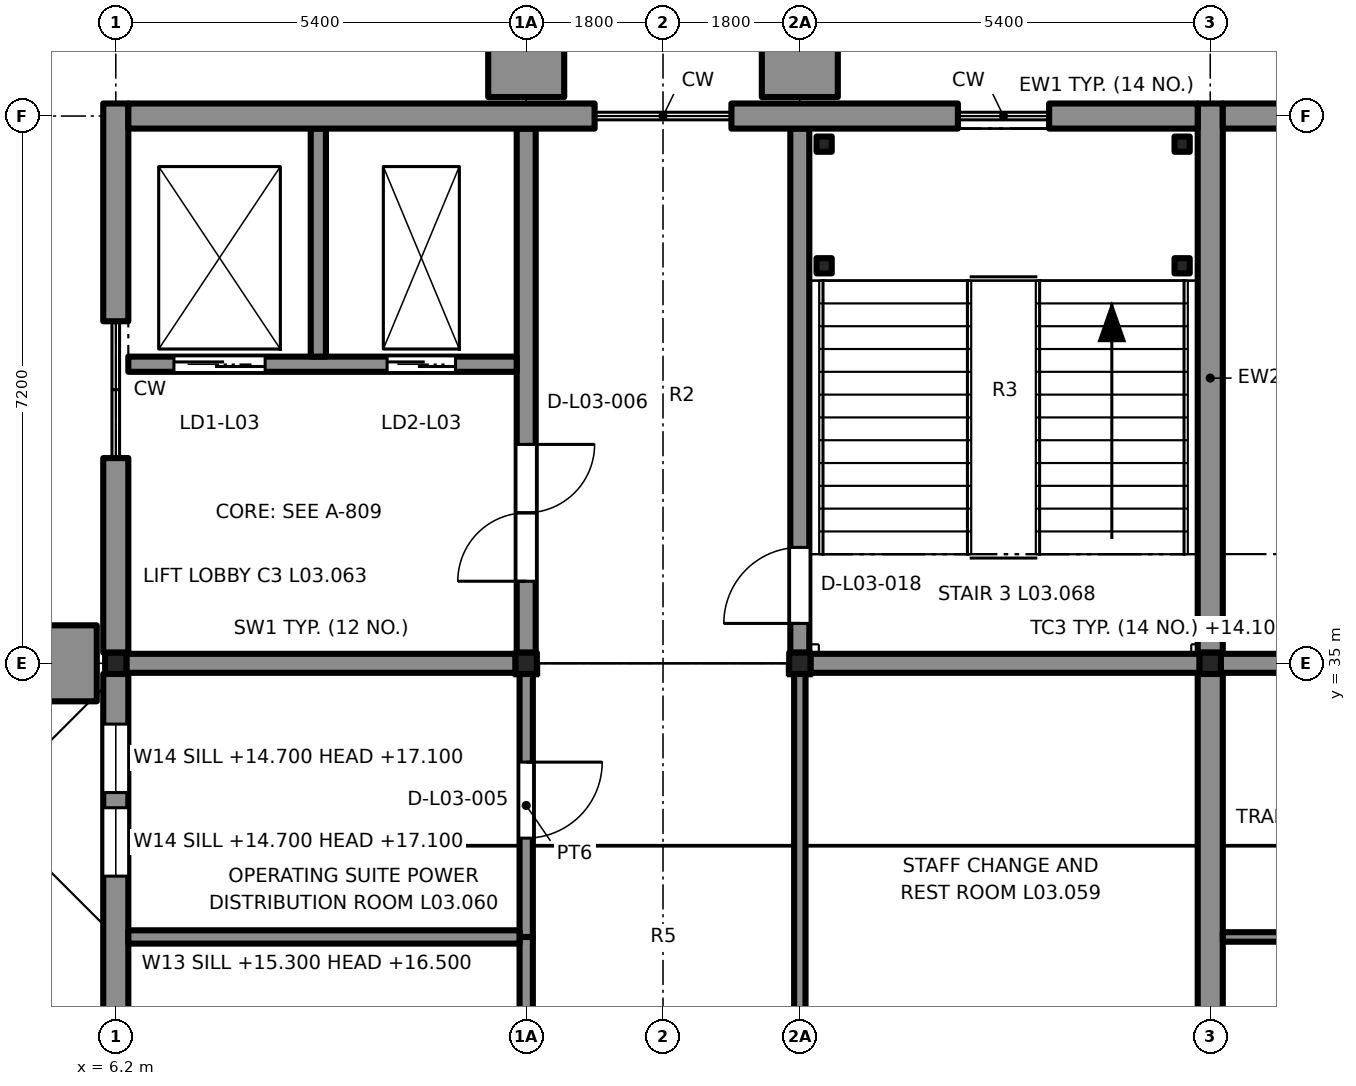
"""IFC4 building model, lengths in metres.
Left out: names, types, materials, properties, quantities, classifications, styles, units other than length and angle.
Written with IfcOpenShell. Run it as: python <this file> out.ifc"""

import sys

from ifc_helpers import new_model, si_unit, direction, frame, frame_2d, origin, origin_2d, place, context, subcontext, project, spatial, rectangle, extrude, element, fill, save


model = new_model("IFC4")
c1 = context("Model", 3, precision=1e-05, world=origin(), true_north=direction((0.0, 1.0)))
c2 = subcontext(c1, "Body", "Model", "MODEL_VIEW")
j1 = project(units=[si_unit("LENGTHUNIT", "METRE"), si_unit("PLANEANGLEUNIT", "RADIAN")], contexts=[c1])
p1 = place(None, origin())
s1 = spatial("IfcSite", under=j1, at=p1, CompositionType="ELEMENT")
p2 = place(p1, origin())
s2 = spatial("IfcBuilding", under=s1, at=p2, CompositionType="ELEMENT")
p3 = place(p2, frame((0.0, 0.0, 14.1)))
s3 = spatial("IfcBuildingStorey", under=s2, at=p3, CompositionType="ELEMENT", Elevation=14.1)
for number, where, z_axis, x_axis in (
    (1, (6.2, 35.0, 0.0), (0.0, 0.0, 1.0), (1.0, 0.0, 0.0)),
    (2, (11.6, 35.0, 0.0), (0.0, 0.0, 1.0), (1.0, 0.0, 0.0)),
    (3, (15.2, 35.0, 0.0), (0.0, 0.0, 1.0), (1.0, 0.0, 0.0)),
    (4, (20.6, 35.0, 0.0), (0.0, 0.0, 1.0), (1.0, 0.0, 0.0)),
):
    element("IfcColumn", number, at=place(p3, frame(where, z_axis=z_axis, x_axis=x_axis)), inside=s3, PredefinedType="COLUMN", context=c2, shape_type="SweptSolid", body=[
        extrude(rectangle(XDim=0.28, YDim=0.28, at=origin_2d()), origin(), (0.0, 0.0, 1.0), 3.9),
    ])
p4 = place(p3, frame((15.2, 35.14, 0.0), z_axis=(0.0, 0.0, 1.0), x_axis=(0.0, 1.0, 0.0)))
e5 = element("IfcWall", 5, at=p4, inside=s3, PredefinedType="SHEAR", context=c2, shape_type="SweptSolid", body=[
    extrude(rectangle(XDim=6.895, YDim=0.25, at=frame_2d((3.448, 0.0))), origin(), (0.0, 0.0, 1.0), 3.2),
])
p5 = place(p4, frame((0.385, 0.0, 0.0)))
e6 = element("IfcOpeningElement", 6, at=p5, cuts=e5, PredefinedType="OPENING", context=c2, shape_type="SweptSolid", body=[
    extrude(rectangle(XDim=1.0, YDim=2.1, at=frame_2d((0.5, 1.05))), frame((0.0, 0.135, 0.0), z_axis=(0.0, -1.0, 0.0), x_axis=(1.0, 0.0, 0.0)), (0.0, 0.0, 1.0), 0.27),
])
p6 = place(p3, frame((15.34, 35.0, 0.0), z_axis=(0.0, 0.0, 1.0), x_axis=(1.0, 0.0, 0.0)))
e7 = element("IfcWall", 7, at=p6, inside=s3, PredefinedType="SHEAR", context=c2, shape_type="SweptSolid", body=[
    extrude(rectangle(XDim=5.12, YDim=0.25, at=frame_2d((2.56, 0.0))), origin(), (0.0, 0.0, 1.0), 3.2),
])
p7 = place(p3, frame((11.6, 35.14, 0.0), z_axis=(0.0, 0.0, 1.0), x_axis=(0.0, 1.0, 0.0)))
e8 = element("IfcWall", 8, at=p7, inside=s3, PredefinedType="SHEAR", context=c2, shape_type="SweptSolid", body=[
    extrude(rectangle(XDim=6.895, YDim=0.25, at=frame_2d((3.448, 0.0))), origin(), (0.0, 0.0, 1.0), 3.2),
])
p8 = place(p7, frame((0.94, 0.0, 0.0)))
e9 = element("IfcOpeningElement", 9, at=p8, cuts=e8, PredefinedType="OPENING", context=c2, shape_type="SweptSolid", body=[
    extrude(rectangle(XDim=1.8, YDim=2.1, at=frame_2d((0.9, 1.05))), frame((0.0, 0.135, 0.0), z_axis=(0.0, -1.0, 0.0), x_axis=(1.0, 0.0, 0.0)), (0.0, 0.0, 1.0), 0.27),
])
p9 = place(p3, frame((6.34, 35.0, 0.0), z_axis=(0.0, 0.0, 1.0), x_axis=(1.0, 0.0, 0.0)))
e10 = element("IfcWall", 10, at=p9, inside=s3, PredefinedType="SHEAR", context=c2, shape_type="SweptSolid", body=[
    extrude(rectangle(XDim=5.12, YDim=0.25, at=frame_2d((2.56, 0.0))), origin(), (0.0, 0.0, 1.0), 3.2),
])
p10 = place(p3, frame((6.365, 38.935, 0.0), z_axis=(0.0, 0.0, 1.0), x_axis=(1.0, 0.0, 0.0)))
e11 = element("IfcWall", 11, at=p10, inside=s3, PredefinedType="SHEAR", context=c2, shape_type="SweptSolid", body=[
    extrude(rectangle(XDim=5.11, YDim=0.2, at=frame_2d((2.555, 0.0))), origin(), (0.0, 0.0, 1.0), 3.2),
])
p11 = place(p10, frame((0.6, 0.0, 0.0)))
e12 = element("IfcOpeningElement", 12, at=p11, cuts=e11, PredefinedType="OPENING", context=c2, shape_type="SweptSolid", body=[
    extrude(rectangle(XDim=1.2, YDim=2.1, at=frame_2d((0.6, 1.05))), frame((0.0, 0.11, 0.0), z_axis=(0.0, -1.0, 0.0), x_axis=(1.0, 0.0, 0.0)), (0.0, 0.0, 1.0), 0.22),
])
p12 = place(p10, frame((3.405, 0.0, 0.0)))
e13 = element("IfcOpeningElement", 13, at=p12, cuts=e11, PredefinedType="OPENING", context=c2, shape_type="SweptSolid", body=[
    extrude(rectangle(XDim=0.9, YDim=2.1, at=frame_2d((0.45, 1.05))), frame((0.0, 0.11, 0.0), z_axis=(0.0, -1.0, 0.0), x_axis=(1.0, 0.0, 0.0)), (0.0, 0.0, 1.0), 0.22),
])
p13 = place(p3, frame((8.865, 42.035, 0.0), z_axis=(0.0, 0.0, 1.0), x_axis=(0.0, -1.0, 0.0)))
e14 = element("IfcWall", 14, at=p13, inside=s3, PredefinedType="SHEAR", context=c2, shape_type="SweptSolid", body=[
    extrude(rectangle(XDim=3.0, YDim=0.2, at=frame_2d((1.5, 0.0))), origin(), (0.0, 0.0, 1.0), 3.2),
])
for number, where, z_axis, x_axis in (
    (15, (15.52, 41.83, 0.0), (0.0, 0.0, 1.0), (1.0, 0.0, 0.0)),
    (16, (20.23, 41.83, 0.0), (0.0, 0.0, 1.0), (1.0, 0.0, 0.0)),
    (17, (15.52, 40.23, 0.0), (0.0, 0.0, 1.0), (1.0, 0.0, 0.0)),
    (18, (20.23, 40.23, 0.0), (0.0, 0.0, 1.0), (1.0, 0.0, 0.0)),
):
    element("IfcColumn", number, at=place(p3, frame(where, z_axis=z_axis, x_axis=x_axis)), inside=s3, PredefinedType="COLUMN", context=c2, shape_type="SweptSolid", body=[
        extrude(rectangle(XDim=0.2, YDim=0.2, at=origin_2d()), origin(), (0.0, 0.0, 1.0), 1.75),
    ])
p14 = place(p3, frame((20.74, 35.0, 0.0), z_axis=(0.0, 0.0, 1.0), x_axis=(1.0, 0.0, 0.0)))
e19 = element("IfcWall", 19, at=p14, inside=s3, PredefinedType="SHEAR", context=c2, shape_type="SweptSolid", body=[
    extrude(rectangle(XDim=5.12, YDim=0.25, at=frame_2d((2.56, 0.0))), origin(), (0.0, 0.0, 1.0), 3.2),
])
p15 = place(p3, frame((6.2, 27.94, 0.0), z_axis=(0.0, 0.0, 1.0), x_axis=(0.0, 1.0, 0.0)))
e20 = element("IfcWall", 20, at=p15, inside=s3, PredefinedType="SOLIDWALL", context=c2, shape_type="SweptSolid", body=[
    extrude(rectangle(XDim=6.92, YDim=0.33, at=frame_2d((3.46, 0.0))), origin(), (0.0, 0.0, 1.0), 3.2),
])
p16 = place(p15, frame((1.06, 0.0, 1.2)))
e21 = element("IfcOpeningElement", 21, at=p16, cuts=e20, PredefinedType="OPENING", context=c2, shape_type="SweptSolid", body=[
    extrude(rectangle(XDim=1.2, YDim=1.2, at=frame_2d((0.6, 0.6))), frame((0.0, 0.175, 0.0), z_axis=(0.0, -1.0, 0.0), x_axis=(1.0, 0.0, 0.0)), (0.0, 0.0, 1.0), 0.35),
])
p17 = place(p15, frame((4.26, 0.0, 0.6)))
e22 = element("IfcOpeningElement", 22, at=p17, cuts=e20, PredefinedType="OPENING", context=c2, shape_type="SweptSolid", body=[
    extrude(rectangle(XDim=0.9, YDim=2.4, at=frame_2d((0.45, 1.2))), frame((0.0, 0.175, 0.0), z_axis=(0.0, -1.0, 0.0), x_axis=(1.0, 0.0, 0.0)), (0.0, 0.0, 1.0), 0.35),
])
p18 = place(p15, frame((5.36, 0.0, 0.6)))
e23 = element("IfcOpeningElement", 23, at=p18, cuts=e20, PredefinedType="OPENING", context=c2, shape_type="SweptSolid", body=[
    extrude(rectangle(XDim=0.9, YDim=2.4, at=frame_2d((0.45, 1.2))), frame((0.0, 0.175, 0.0), z_axis=(0.0, -1.0, 0.0), x_axis=(1.0, 0.0, 0.0)), (0.0, 0.0, 1.0), 0.35),
])
p19 = place(p3, frame((6.2, 35.14, 0.0), z_axis=(0.0, 0.0, 1.0), x_axis=(0.0, 1.0, 0.0)))
e24 = element("IfcWall", 24, at=p19, inside=s3, PredefinedType="SOLIDWALL", context=c2, shape_type="SweptSolid", body=[
    extrude(rectangle(XDim=2.56, YDim=0.33, at=frame_2d((1.28, 0.0))), origin(), (0.0, 0.0, 1.0), 3.2),
])
p20 = place(p3, frame((6.2, 39.5, 0.0), z_axis=(0.0, 0.0, 1.0), x_axis=(0.0, 1.0, 0.0)))
e25 = element("IfcWall", 25, at=p20, inside=s3, PredefinedType="SOLIDWALL", context=c2, shape_type="SweptSolid", body=[
    extrude(rectangle(XDim=2.865, YDim=0.33, at=frame_2d((1.433, 0.0))), origin(), (0.0, 0.0, 1.0), 3.2),
])
p21 = place(p3, frame((5.575, 34.5, 0.0), z_axis=(0.0, 0.0, 1.0), x_axis=(0.0, 1.0, 0.0)))
e26 = element("IfcWall", 26, at=p21, inside=s3, PredefinedType="SOLIDWALL", context=c2, shape_type="SweptSolid", body=[
    extrude(rectangle(XDim=1.0, YDim=0.75, at=frame_2d((0.5, 0.0))), origin(), (0.0, 0.0, 1.0), 3.9),
])
p22 = place(p3, frame((20.6, 34.86, 0.0), z_axis=(0.0, 0.0, 1.0), x_axis=(0.0, -1.0, 0.0)))
e27 = element("IfcWall", 27, at=p22, inside=s3, PredefinedType="SOLIDWALL", context=c2, shape_type="SweptSolid", body=[
    extrude(rectangle(XDim=6.92, YDim=0.33, at=frame_2d((3.46, 0.0))), origin(), (0.0, 0.0, 1.0), 3.2),
])
p23 = place(p3, frame((20.6, 42.365, 0.0), z_axis=(0.0, 0.0, 1.0), x_axis=(0.0, -1.0, 0.0)))
e28 = element("IfcWall", 28, at=p23, inside=s3, PredefinedType="SOLIDWALL", context=c2, shape_type="SweptSolid", body=[
    extrude(rectangle(XDim=7.225, YDim=0.33, at=frame_2d((3.613, 0.0))), origin(), (0.0, 0.0, 1.0), 3.2),
])
p24 = place(p3, frame((6.365, 42.2, 0.0), z_axis=(0.0, 0.0, 1.0), x_axis=(1.0, 0.0, 0.0)))
e29 = element("IfcWall", 29, at=p24, inside=s3, PredefinedType="SOLIDWALL", context=c2, shape_type="SweptSolid", body=[
    extrude(rectangle(XDim=6.135, YDim=0.33, at=frame_2d((3.067, 0.0))), origin(), (0.0, 0.0, 1.0), 3.2),
])
p25 = place(p3, frame((14.3, 42.2, 0.0), z_axis=(0.0, 0.0, 1.0), x_axis=(1.0, 0.0, 0.0)))
e30 = element("IfcWall", 30, at=p25, inside=s3, PredefinedType="SOLIDWALL", context=c2, shape_type="SweptSolid", body=[
    extrude(rectangle(XDim=2.98, YDim=0.33, at=frame_2d((1.49, 0.0))), origin(), (0.0, 0.0, 1.0), 3.2),
])
p26 = place(p3, frame((18.48, 42.2, 0.0), z_axis=(0.0, 0.0, 1.0), x_axis=(1.0, 0.0, 0.0)))
e31 = element("IfcWall", 31, at=p26, inside=s3, PredefinedType="SOLIDWALL", context=c2, shape_type="SweptSolid", body=[
    extrude(rectangle(XDim=1.955, YDim=0.33, at=frame_2d((0.978, 0.0))), origin(), (0.0, 0.0, 1.0), 3.2),
])
for number, where, z_axis, x_axis in (
    (32, (11.1, 42.825, 0.0), (0.0, 0.0, 1.0), (1.0, 0.0, 0.0)),
    (33, (14.7, 42.825, 0.0), (0.0, 0.0, 1.0), (1.0, 0.0, 0.0)),
):
    element("IfcWall", number, at=place(p3, frame(where, z_axis=z_axis, x_axis=x_axis)), inside=s3, PredefinedType="SOLIDWALL", context=c2, shape_type="SweptSolid", body=[
        extrude(rectangle(XDim=1.0, YDim=0.75, at=frame_2d((0.5, 0.0))), origin(), (0.0, 0.0, 1.0), 3.9),
    ])
for number, where, z_axis, x_axis in (
    (34, (11.9, 42.15, 3.6), (0.0, 0.0, 1.0), (1.0, 0.0, 0.0)),
    (35, (13.4, 42.15, 3.6), (0.0, 0.0, 1.0), (1.0, 0.0, 0.0)),
):
    element("IfcWall", number, at=place(p3, frame(where, z_axis=z_axis, x_axis=x_axis)), inside=s3, PredefinedType="SOLIDWALL", context=c2, shape_type="SweptSolid", body=[
        extrude(rectangle(XDim=1.5, YDim=0.23, at=frame_2d((0.75, 0.0))), origin(), (0.0, 0.0, 1.0), 1.7),
    ])
p27 = place(p3, frame((20.765, 42.2, 0.0), z_axis=(0.0, 0.0, 1.0), x_axis=(1.0, 0.0, 0.0)))
e36 = element("IfcWall", 36, at=p27, inside=s3, PredefinedType="SOLIDWALL", context=c2, shape_type="SweptSolid", body=[
    extrude(rectangle(XDim=1.955, YDim=0.33, at=frame_2d((0.978, 0.0))), origin(), (0.0, 0.0, 1.0), 3.2),
])
p28 = place(p3, frame((6.2, 29.3, 3.2), z_axis=(0.0, 0.0, 1.0), x_axis=(0.0, 1.0, 0.0)))
e37 = element("IfcWall", 37, at=p28, inside=s3, PredefinedType="SOLIDWALL", context=c2, shape_type="SweptSolid", body=[
    extrude(rectangle(XDim=1.5, YDim=0.23, at=frame_2d((0.75, 0.0))), origin(), (0.0, 0.0, 1.0), 3.1),
])
p29 = place(p3, frame((6.2, 30.8, 3.2), z_axis=(0.0, 0.0, 1.0), x_axis=(0.0, 1.0, 0.0)))
e38 = element("IfcWall", 38, at=p29, inside=s3, PredefinedType="SOLIDWALL", context=c2, shape_type="SweptSolid", body=[
    extrude(rectangle(XDim=1.2, YDim=0.23, at=frame_2d((0.6, 0.0))), origin(), (0.0, 0.0, 1.0), 4.1),
])
p30 = place(p3, frame((6.2, 32.0, 3.2), z_axis=(0.0, 0.0, 1.0), x_axis=(0.0, 1.0, 0.0)))
e39 = element("IfcWall", 39, at=p30, inside=s3, PredefinedType="SOLIDWALL", context=c2, shape_type="SweptSolid", body=[
    extrude(rectangle(XDim=1.5, YDim=0.23, at=frame_2d((0.75, 0.0))), origin(), (0.0, 0.0, 1.0), 3.1),
])
p31 = place(p3, frame((6.2, 33.5, 3.2), z_axis=(0.0, 0.0, 1.0), x_axis=(0.0, 1.0, 0.0)))
e40 = element("IfcWall", 40, at=p31, inside=s3, PredefinedType="SOLIDWALL", context=c2, shape_type="SweptSolid", body=[
    extrude(rectangle(XDim=1.36, YDim=0.23, at=frame_2d((0.68, 0.0))), origin(), (0.0, 0.0, 1.0), 2.1),
])
p32 = place(p3, frame((11.6, 31.4, 0.0), z_axis=(0.0, 0.0, 1.0), x_axis=(0.0, -1.0, 0.0)))
e41 = element("IfcWall", 41, at=p32, inside=s3, PredefinedType="PARTITIONING", context=c2, shape_type="SweptSolid", body=[
    extrude(rectangle(XDim=3.46, YDim=0.175, at=frame_2d((1.73, 0.0))), origin(), (0.0, 0.0, 1.0), 5.485),
])
p33 = place(p32, frame((1.3, 0.0, 0.0)))
e42 = element("IfcOpeningElement", 42, at=p33, cuts=e41, PredefinedType="OPENING", context=c2, shape_type="SweptSolid", body=[
    extrude(rectangle(XDim=1.0, YDim=2.1, at=frame_2d((0.5, 1.05))), frame((0.0, 0.097, 0.0), z_axis=(0.0, -1.0, 0.0), x_axis=(1.0, 0.0, 0.0)), (0.0, 0.0, 1.0), 0.195),
])
p34 = place(p3, frame((11.6, 34.86, 0.0), z_axis=(0.0, 0.0, 1.0), x_axis=(0.0, -1.0, 0.0)))
e43 = element("IfcWall", 43, at=p34, inside=s3, PredefinedType="PARTITIONING", context=c2, shape_type="SweptSolid", body=[
    extrude(rectangle(XDim=3.46, YDim=0.175, at=frame_2d((1.73, 0.0))), origin(), (0.0, 0.0, 1.0), 5.485),
])
p35 = place(p34, frame((1.16, 0.0, 0.0)))
e44 = element("IfcOpeningElement", 44, at=p35, cuts=e43, PredefinedType="OPENING", context=c2, shape_type="SweptSolid", body=[
    extrude(rectangle(XDim=1.0, YDim=2.1, at=frame_2d((0.5, 1.05))), frame((0.0, 0.097, 0.0), z_axis=(0.0, -1.0, 0.0), x_axis=(1.0, 0.0, 0.0)), (0.0, 0.0, 1.0), 0.195),
])
p36 = place(p3, frame((6.365, 31.4, 0.0), z_axis=(0.0, 0.0, 1.0), x_axis=(1.0, 0.0, 0.0)))
e45 = element("IfcWall", 45, at=p36, inside=s3, PredefinedType="PARTITIONING", context=c2, shape_type="SweptSolid", body=[
    extrude(rectangle(XDim=5.147, YDim=0.175, at=frame_2d((2.574, 0.0))), origin(), (0.0, 0.0, 1.0), 5.485),
])
p37 = place(p3, frame((15.2, 34.86, 0.0), z_axis=(0.0, 0.0, 1.0), x_axis=(0.0, -1.0, 0.0)))
e46 = element("IfcWall", 46, at=p37, inside=s3, PredefinedType="PARTITIONING", context=c2, shape_type="SweptSolid", body=[
    extrude(rectangle(XDim=6.92, YDim=0.15, at=frame_2d((3.46, 0.0))), origin(), (0.0, 0.0, 1.0), 5.485),
])
p38 = place(p37, frame((4.76, 0.0, 0.0)))
e47 = element("IfcOpeningElement", 47, at=p38, cuts=e46, PredefinedType="OPENING", context=c2, shape_type="SweptSolid", body=[
    extrude(rectangle(XDim=1.0, YDim=2.1, at=frame_2d((0.5, 1.05))), frame((0.0, 0.085, 0.0), z_axis=(0.0, -1.0, 0.0), x_axis=(1.0, 0.0, 0.0)), (0.0, 0.0, 1.0), 0.17),
])
p39 = place(p3, frame((20.765, 31.4, 0.0), z_axis=(0.0, 0.0, 1.0), x_axis=(1.0, 0.0, 0.0)))
e48 = element("IfcWall", 48, at=p39, inside=s3, PredefinedType="PARTITIONING", context=c2, shape_type="SweptSolid", body=[
    extrude(rectangle(XDim=5.16, YDim=0.125, at=frame_2d((2.58, 0.0))), origin(), (0.0, 0.0, 1.0), 5.233),
])
p40 = place(p5, origin())
e49 = element("IfcDoor", 49, at=p40, inside=s3, OperationType="SINGLE_SWING_LEFT", PredefinedType="DOOR", context=c2, shape_type="SweptSolid", body=[
    extrude(rectangle(XDim=1.0, YDim=2.1, at=frame_2d((0.5, 1.05))), frame((0.0, 0.025, 0.0), z_axis=(0.0, -1.0, 0.0), x_axis=(1.0, 0.0, 0.0)), (0.0, 0.0, 1.0), 0.05),
])
fill(e6, e49)
p41 = place(p8, origin())
e50 = element("IfcDoor", 50, at=p41, inside=s3, OperationType="DOUBLE_DOOR_SINGLE_SWING", PredefinedType="DOOR", context=c2, shape_type="SweptSolid", body=[
    extrude(rectangle(XDim=1.8, YDim=2.1, at=frame_2d((0.9, 1.05))), frame((0.0, 0.025, 0.0), z_axis=(0.0, -1.0, 0.0), x_axis=(1.0, 0.0, 0.0)), (0.0, 0.0, 1.0), 0.05),
])
fill(e9, e50)
p42 = place(p11, origin())
e51 = element("IfcDoor", 51, at=p42, inside=s3, OperationType="DOUBLE_DOOR_SLIDING", PredefinedType="DOOR", context=c2, shape_type="SweptSolid", body=[
    extrude(rectangle(XDim=1.2, YDim=2.1, at=frame_2d((0.6, 1.05))), frame((0.0, 0.025, 0.0), z_axis=(0.0, -1.0, 0.0), x_axis=(1.0, 0.0, 0.0)), (0.0, 0.0, 1.0), 0.05),
])
fill(e12, e51)
p43 = place(p12, origin())
e52 = element("IfcDoor", 52, at=p43, inside=s3, OperationType="DOUBLE_DOOR_SLIDING", PredefinedType="DOOR", context=c2, shape_type="SweptSolid", body=[
    extrude(rectangle(XDim=0.9, YDim=2.1, at=frame_2d((0.45, 1.05))), frame((0.0, 0.025, 0.0), z_axis=(0.0, -1.0, 0.0), x_axis=(1.0, 0.0, 0.0)), (0.0, 0.0, 1.0), 0.05),
])
fill(e13, e52)
p44 = place(p17, origin())
e53 = element("IfcWindow", 53, at=p44, inside=s3, PartitioningType="SINGLE_PANEL", PredefinedType="WINDOW", context=c2, shape_type="SweptSolid", body=[
    extrude(rectangle(XDim=0.9, YDim=2.4, at=frame_2d((0.45, 1.2))), frame((0.0, -0.03, 0.0), z_axis=(0.0, -1.0, 0.0), x_axis=(1.0, 0.0, 0.0)), (0.0, 0.0, 1.0), 0.06),
])
fill(e22, e53)
p45 = place(p18, origin())
e54 = element("IfcWindow", 54, at=p45, inside=s3, PartitioningType="SINGLE_PANEL", PredefinedType="WINDOW", context=c2, shape_type="SweptSolid", body=[
    extrude(rectangle(XDim=0.9, YDim=2.4, at=frame_2d((0.45, 1.2))), frame((0.0, -0.03, 0.0), z_axis=(0.0, -1.0, 0.0), x_axis=(1.0, 0.0, 0.0)), (0.0, 0.0, 1.0), 0.06),
])
fill(e23, e54)
p46 = place(p35, origin())
e55 = element("IfcDoor", 55, at=p46, inside=s3, OperationType="SINGLE_SWING_LEFT", PredefinedType="DOOR", context=c2, shape_type="SweptSolid", body=[
    extrude(rectangle(XDim=1.0, YDim=2.1, at=frame_2d((0.5, 1.05))), frame((0.0, 0.025, 0.0), z_axis=(0.0, -1.0, 0.0), x_axis=(1.0, 0.0, 0.0)), (0.0, 0.0, 1.0), 0.05),
])
fill(e44, e55)
save(model, sys.argv[1])
